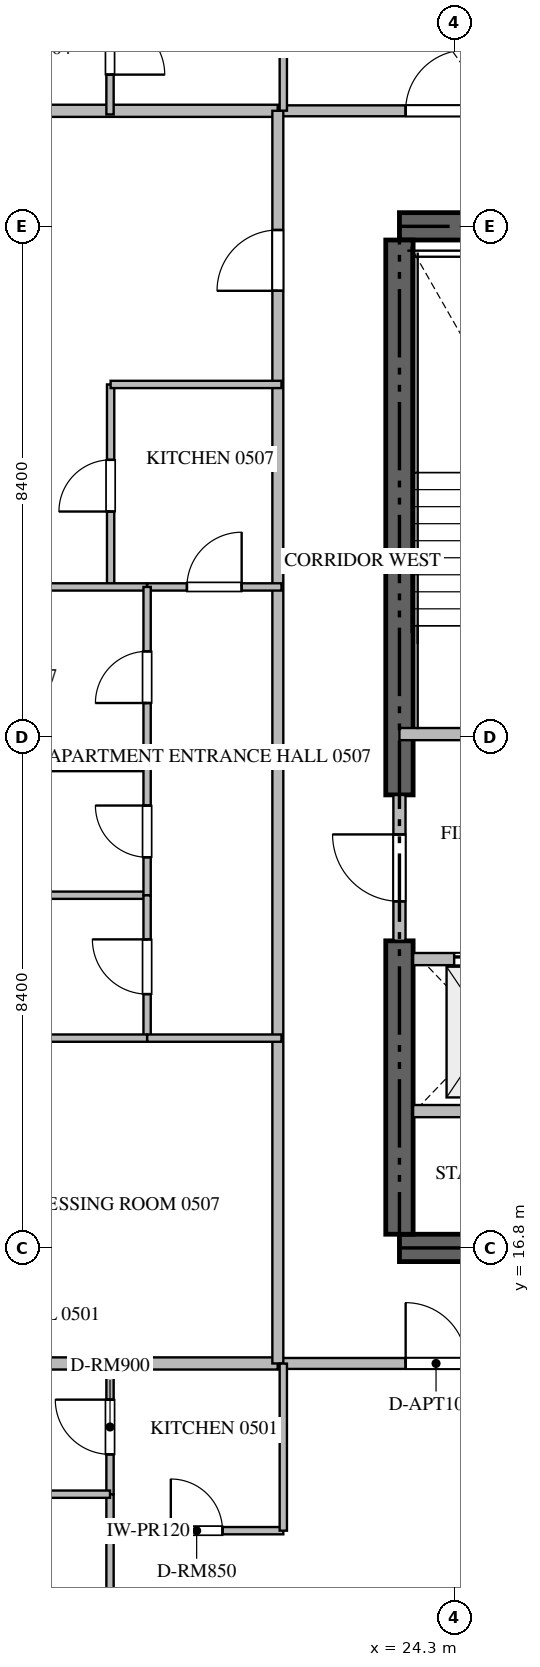
"""IFC4 building model, lengths in metres.
Left out: names, types, materials, properties, quantities, classifications, styles, units other than length and angle.
Written with IfcOpenShell. Run it as: python <this file> out.ifc"""

import sys

from ifc_helpers import new_model, si_unit, direction, frame, frame_2d, origin, place, context, subcontext, project, spatial, rectangle, extrude, source, transform, mapped, element, fill, save


model = new_model("IFC4")
c1 = context("Model", 3, precision=1e-05, world=origin(), true_north=direction((0.0, 1.0)))
c2 = subcontext(c1, "Body", "Model", "MODEL_VIEW")
j1 = project(units=[si_unit("LENGTHUNIT", "METRE"), si_unit("PLANEANGLEUNIT", "RADIAN")], contexts=[c1])
p1 = place(None, origin())
s1 = spatial("IfcSite", under=j1, at=p1, CompositionType="ELEMENT")
p2 = place(p1, origin())
s2 = spatial("IfcBuilding", under=s1, at=p2, CompositionType="ELEMENT")
p3 = place(p2, frame((0.0, 0.0, 26.7)))
s3 = spatial("IfcBuildingStorey", under=s2, at=p3, CompositionType="ELEMENT", Elevation=26.7)
for number, where, z_axis, x_axis in (
    (1, (23.4, 16.8, -0.44), (0.0, 0.0, 1.0), (1.0, 0.0, 0.0)),
    (2, (41.4, 33.6, -0.44), (0.0, 0.0, 1.0), (-1.0, 0.0, 0.0)),
):
    element("IfcWall", number, at=place(p3, frame(where, z_axis=z_axis, x_axis=x_axis)), inside=s3, PredefinedType="SHEAR", context=c2, shape_type="SweptSolid", body=[
        extrude(rectangle(XDim=18.0, YDim=0.45, at=frame_2d((9.0, 0.0))), origin(), (0.0, 0.0, 1.0), 3.928),
    ])
p4 = place(p3, frame((23.4, 17.025, -0.44), z_axis=(0.0, 0.0, 1.0), x_axis=(0.0, 1.0, 0.0)))
e3 = element("IfcWall", 3, at=p4, inside=s3, PredefinedType="SHEAR", context=c2, shape_type="SweptSolid", body=[
    extrude(rectangle(XDim=4.825, YDim=0.45, at=frame_2d((2.413, 0.0))), origin(), (0.0, 0.0, 1.0), 3.928),
])
p5 = place(p3, frame((23.4, 24.25, -0.44), z_axis=(0.0, 0.0, 1.0), x_axis=(0.0, 1.0, 0.0)))
e4 = element("IfcWall", 4, at=p5, inside=s3, PredefinedType="SHEAR", context=c2, shape_type="SweptSolid", body=[
    extrude(rectangle(XDim=9.125, YDim=0.45, at=frame_2d((4.562, 0.0))), origin(), (0.0, 0.0, 1.0), 3.928),
])
p6 = place(p3, frame((23.4, 25.25, 0.0), z_axis=(0.0, 0.0, 1.0), x_axis=(1.0, 0.0, 0.0)))
e5 = element("IfcWall", 5, at=p6, inside=s3, PredefinedType="STANDARD", context=c2, shape_type="SweptSolid", body=[
    extrude(rectangle(XDim=4.45, YDim=0.2, at=frame_2d((2.225, 0.0))), origin(), (0.0, 0.0, 1.0), 3.49),
])
p7 = place(p6, frame((1.65, 0.0, 0.0)))
e6 = element("IfcOpeningElement", 6, at=p7, cuts=e5, PredefinedType="OPENING", context=c2, shape_type="SweptSolid", body=[
    extrude(rectangle(XDim=1.1, YDim=2.15, at=frame_2d((0.55, 1.075))), frame((0.0, 0.11, 0.0), z_axis=(0.0, -1.0, 0.0), x_axis=(1.0, 0.0, 0.0)), (0.0, 0.0, 1.0), 0.22),
])
p8 = place(p3, frame((23.625, 21.55, 0.0), z_axis=(0.0, 0.0, 1.0), x_axis=(1.0, 0.0, 0.0)))
e7 = element("IfcWall", 7, at=p8, inside=s3, PredefinedType="STANDARD", context=c2, shape_type="SweptSolid", body=[
    extrude(rectangle(XDim=2.425, YDim=0.2, at=frame_2d((1.212, 0.0))), origin(), (0.0, 0.0, 1.0), 3.49),
])
p9 = place(p8, frame((0.675, 0.0, 0.0)))
e8 = element("IfcOpeningElement", 8, at=p9, cuts=e7, PredefinedType="OPENING", context=c2, shape_type="SweptSolid", body=[
    extrude(rectangle(XDim=1.2, YDim=2.2, at=frame_2d((0.6, 1.1))), frame((0.0, 0.11, 0.0), z_axis=(0.0, -1.0, 0.0), x_axis=(1.0, 0.0, 0.0)), (0.0, 0.0, 1.0), 0.22),
])
p10 = place(p3, frame((23.625, 19.05, 0.0), z_axis=(0.0, 0.0, 1.0), x_axis=(1.0, 0.0, 0.0)))
e9 = element("IfcWall", 9, at=p10, inside=s3, PredefinedType="STANDARD", context=c2, shape_type="SweptSolid", body=[
    extrude(rectangle(XDim=2.425, YDim=0.2, at=frame_2d((1.212, 0.0))), origin(), (0.0, 0.0, 1.0), 3.49),
])
p11 = place(p3, frame((23.4, 21.852, 0.0), z_axis=(0.0, 0.0, 1.0), x_axis=(0.0, 1.0, 0.0)))
e10 = element("IfcWall", 10, at=p11, inside=s3, PredefinedType="STANDARD", context=c2, shape_type="SweptSolid", body=[
    extrude(rectangle(XDim=2.396, YDim=0.2, at=frame_2d((1.198, 0.0))), origin(), (0.0, 0.0, 1.0), 3.49),
])
p12 = place(p11, frame((0.648, 0.0, 0.0)))
e11 = element("IfcOpeningElement", 11, at=p12, cuts=e10, PredefinedType="OPENING", context=c2, shape_type="SweptSolid", body=[
    extrude(rectangle(XDim=1.1, YDim=2.15, at=frame_2d((0.55, 1.075))), frame((0.0, 0.11, 0.0), z_axis=(0.0, -1.0, 0.0), x_axis=(1.0, 0.0, 0.0)), (0.0, 0.0, 1.0), 0.22),
])
for number, where, z_axis, x_axis in (
    (12, (6.082, 14.9, 0.0), (0.0, 0.0, 1.0), (1.0, 0.0, 0.0)),
    (13, (6.082, 35.5, 0.0), (0.0, 0.0, 1.0), (1.0, 0.0, 0.0)),
):
    element("IfcWall", number, at=place(p3, frame(where, z_axis=z_axis, x_axis=x_axis)), inside=s3, PredefinedType="PARTITIONING", context=c2, shape_type="SweptSolid", body=[
        extrude(rectangle(XDim=15.318, YDim=0.2, at=frame_2d((7.659, 0.0))), origin(), (0.0, 0.0, 1.0), 3.49),
    ])
p13 = place(p3, frame((21.402, 14.9, 0.0), z_axis=(0.0, 0.0, 1.0), x_axis=(1.0, 0.0, 0.0)))
e14 = element("IfcWall", 14, at=p13, inside=s3, PredefinedType="PARTITIONING", context=c2, shape_type="SweptSolid", body=[
    extrude(rectangle(XDim=21.996, YDim=0.18, at=frame_2d((10.998, 0.0))), origin(), (0.0, 0.0, 1.0), 3.49),
])
p14 = place(p13, frame((2.1, 0.0, 0.0)))
e15 = element("IfcOpeningElement", 15, at=p14, cuts=e14, PredefinedType="OPENING", context=c2, shape_type="SweptSolid", body=[
    extrude(rectangle(XDim=1.0, YDim=2.15, at=frame_2d((0.5, 1.075))), frame((0.0, 0.1, 0.0), z_axis=(0.0, -1.0, 0.0), x_axis=(1.0, 0.0, 0.0)), (0.0, 0.0, 1.0), 0.2),
])
p15 = place(p13, frame((6.719, 0.0, 0.0)))
e16 = element("IfcOpeningElement", 16, at=p15, cuts=e14, PredefinedType="OPENING", context=c2, shape_type="SweptSolid", body=[
    extrude(rectangle(XDim=1.0, YDim=2.15, at=frame_2d((0.5, 1.075))), frame((0.0, 0.1, 0.0), z_axis=(0.0, -1.0, 0.0), x_axis=(1.0, 0.0, 0.0)), (0.0, 0.0, 1.0), 0.2),
])
p16 = place(p13, frame((18.896, 0.0, 0.0)))
e17 = element("IfcOpeningElement", 17, at=p16, cuts=e14, PredefinedType="OPENING", context=c2, shape_type="SweptSolid", body=[
    extrude(rectangle(XDim=1.0, YDim=2.15, at=frame_2d((0.5, 1.075))), frame((0.0, 0.1, 0.0), z_axis=(0.0, -1.0, 0.0), x_axis=(1.0, 0.0, 0.0)), (0.0, 0.0, 1.0), 0.2),
])
p17 = place(p3, frame((21.402, 35.5, 0.0), z_axis=(0.0, 0.0, 1.0), x_axis=(1.0, 0.0, 0.0)))
e18 = element("IfcWall", 18, at=p17, inside=s3, PredefinedType="PARTITIONING", context=c2, shape_type="SweptSolid", body=[
    extrude(rectangle(XDim=21.996, YDim=0.18, at=frame_2d((10.998, 0.0))), origin(), (0.0, 0.0, 1.0), 3.49),
])
p18 = place(p17, frame((2.1, 0.0, 0.0)))
e19 = element("IfcOpeningElement", 19, at=p18, cuts=e18, PredefinedType="OPENING", context=c2, shape_type="SweptSolid", body=[
    extrude(rectangle(XDim=1.0, YDim=2.15, at=frame_2d((0.5, 1.075))), frame((0.0, 0.1, 0.0), z_axis=(0.0, -1.0, 0.0), x_axis=(1.0, 0.0, 0.0)), (0.0, 0.0, 1.0), 0.2),
])
p19 = place(p17, frame((14.277, 0.0, 0.0)))
e20 = element("IfcOpeningElement", 20, at=p19, cuts=e18, PredefinedType="OPENING", context=c2, shape_type="SweptSolid", body=[
    extrude(rectangle(XDim=1.0, YDim=2.15, at=frame_2d((0.5, 1.075))), frame((0.0, 0.1, 0.0), z_axis=(0.0, -1.0, 0.0), x_axis=(1.0, 0.0, 0.0)), (0.0, 0.0, 1.0), 0.2),
])
p20 = place(p17, frame((18.896, 0.0, 0.0)))
e21 = element("IfcOpeningElement", 21, at=p20, cuts=e18, PredefinedType="OPENING", context=c2, shape_type="SweptSolid", body=[
    extrude(rectangle(XDim=1.0, YDim=2.15, at=frame_2d((0.5, 1.075))), frame((0.0, 0.1, 0.0), z_axis=(0.0, -1.0, 0.0), x_axis=(1.0, 0.0, 0.0)), (0.0, 0.0, 1.0), 0.2),
])
p21 = place(p3, frame((21.4, 14.9, 0.0), z_axis=(0.0, 0.0, 1.0), x_axis=(0.0, 1.0, 0.0)))
e22 = element("IfcWall", 22, at=p21, inside=s3, PredefinedType="PARTITIONING", context=c2, shape_type="SweptSolid", body=[
    extrude(rectangle(XDim=20.6, YDim=0.18, at=frame_2d((10.3, 0.0))), origin(), (0.0, 0.0, 1.0), 3.49),
])
p22 = place(p21, frame((17.64, 0.0, 0.0)))
e23 = element("IfcOpeningElement", 23, at=p22, cuts=e22, PredefinedType="OPENING", context=c2, shape_type="SweptSolid", body=[
    extrude(rectangle(XDim=1.0, YDim=2.15, at=frame_2d((0.5, 1.075))), frame((0.0, 0.1, 0.0), z_axis=(0.0, -1.0, 0.0), x_axis=(1.0, 0.0, 0.0)), (0.0, 0.0, 1.0), 0.2),
])
p23 = place(p3, frame((18.64, 12.15, 0.0), z_axis=(0.0, 0.0, 1.0), x_axis=(1.0, 0.0, 0.0)))
e24 = element("IfcWall", 24, at=p23, inside=s3, PredefinedType="PARTITIONING", context=c2, shape_type="SweptSolid", body=[
    extrude(rectangle(XDim=2.85, YDim=0.12, at=frame_2d((1.425, 0.0))), origin(), (0.0, 0.0, 1.0), 3.49),
])
p24 = place(p23, frame((1.0, 0.0, 0.0)))
e25 = element("IfcOpeningElement", 25, at=p24, cuts=e24, PredefinedType="OPENING", context=c2, shape_type="SweptSolid", body=[
    extrude(rectangle(XDim=0.85, YDim=2.1, at=frame_2d((0.425, 1.05))), frame((0.0, 0.07, 0.0), z_axis=(0.0, -1.0, 0.0), x_axis=(1.0, 0.0, 0.0)), (0.0, 0.0, 1.0), 0.14),
])
p25 = place(p3, frame((21.49, 12.15, 0.0), z_axis=(0.0, 0.0, 1.0), x_axis=(0.0, 1.0, 0.0)))
e26 = element("IfcWall", 26, at=p25, inside=s3, PredefinedType="PARTITIONING", context=c2, shape_type="SweptSolid", body=[
    extrude(rectangle(XDim=2.748, YDim=0.12, at=frame_2d((1.374, 0.0))), origin(), (0.0, 0.0, 1.0), 3.49),
])
p26 = place(p3, frame((18.64, 12.75, 0.0), z_axis=(0.0, 0.0, 1.0), x_axis=(0.0, 1.0, 0.0)))
e27 = element("IfcWall", 27, at=p26, inside=s3, PredefinedType="PARTITIONING", context=c2, shape_type="SweptSolid", body=[
    extrude(rectangle(XDim=2.21, YDim=0.12, at=frame_2d((1.105, 0.0))), origin(), (0.0, 0.0, 1.0), 3.49),
])
p27 = place(p26, frame((0.655, 0.0, 0.0)))
e28 = element("IfcOpeningElement", 28, at=p27, cuts=e27, PredefinedType="OPENING", context=c2, shape_type="SweptSolid", body=[
    extrude(rectangle(XDim=0.9, YDim=2.1, at=frame_2d((0.45, 1.05))), frame((0.0, 0.07, 0.0), z_axis=(0.0, -1.0, 0.0), x_axis=(1.0, 0.0, 0.0)), (0.0, 0.0, 1.0), 0.14),
])
p28 = place(p3, frame((18.64, 7.73, 0.0), z_axis=(0.0, 0.0, 1.0), x_axis=(0.0, 1.0, 0.0)))
e29 = element("IfcWall", 29, at=p28, inside=s3, PredefinedType="PARTITIONING", context=c2, shape_type="SweptSolid", body=[
    extrude(rectangle(XDim=5.018, YDim=0.12, at=frame_2d((2.509, 0.0))), origin(), (0.0, 0.0, 1.0), 3.49),
])
p29 = place(p3, frame((15.592, 12.75, 0.0), z_axis=(0.0, 0.0, 1.0), x_axis=(1.0, 0.0, 0.0)))
e30 = element("IfcWall", 30, at=p29, inside=s3, PredefinedType="PARTITIONING", context=c2, shape_type="SweptSolid", body=[
    extrude(rectangle(XDim=3.048, YDim=0.12, at=frame_2d((1.524, 0.0))), origin(), (0.0, 0.0, 1.0), 3.49),
])
p30 = place(p29, frame((1.099, 0.0, 0.0)))
e31 = element("IfcOpeningElement", 31, at=p30, cuts=e30, PredefinedType="OPENING", context=c2, shape_type="SweptSolid", body=[
    extrude(rectangle(XDim=0.85, YDim=2.1, at=frame_2d((0.425, 1.05))), frame((0.0, 0.07, 0.0), z_axis=(0.0, -1.0, 0.0), x_axis=(1.0, 0.0, 0.0)), (0.0, 0.0, 1.0), 0.14),
])
p31 = place(p3, frame((21.49, 38.25, 0.0), z_axis=(0.0, 0.0, 1.0), x_axis=(0.0, -1.0, 0.0)))
e32 = element("IfcWall", 32, at=p31, inside=s3, PredefinedType="PARTITIONING", context=c2, shape_type="SweptSolid", body=[
    extrude(rectangle(XDim=2.748, YDim=0.12, at=frame_2d((1.374, 0.0))), origin(), (0.0, 0.0, 1.0), 3.49),
])
p32 = place(p3, frame((18.64, 37.65, 0.0), z_axis=(0.0, 0.0, 1.0), x_axis=(0.0, -1.0, 0.0)))
e33 = element("IfcWall", 33, at=p32, inside=s3, PredefinedType="PARTITIONING", context=c2, shape_type="SweptSolid", body=[
    extrude(rectangle(XDim=2.21, YDim=0.12, at=frame_2d((1.105, 0.0))), origin(), (0.0, 0.0, 1.0), 3.49),
])
p33 = place(p32, frame((0.655, 0.0, 0.0)))
e34 = element("IfcOpeningElement", 34, at=p33, cuts=e33, PredefinedType="OPENING", context=c2, shape_type="SweptSolid", body=[
    extrude(rectangle(XDim=0.9, YDim=2.1, at=frame_2d((0.45, 1.05))), frame((0.0, 0.07, 0.0), z_axis=(0.0, -1.0, 0.0), x_axis=(1.0, 0.0, 0.0)), (0.0, 0.0, 1.0), 0.14),
])
p34 = place(p3, frame((18.65, 27.67, 0.0), z_axis=(0.0, 0.0, 1.0), x_axis=(0.0, 1.0, 0.0)))
e35 = element("IfcWall", 35, at=p34, inside=s3, PredefinedType="PARTITIONING", context=c2, shape_type="SweptSolid", body=[
    extrude(rectangle(XDim=3.33, YDim=0.12, at=frame_2d((1.665, 0.0))), origin(), (0.0, 0.0, 1.0), 3.49),
])
p35 = place(p34, frame((1.24, 0.0, 0.0)))
e36 = element("IfcOpeningElement", 36, at=p35, cuts=e35, PredefinedType="OPENING", context=c2, shape_type="SweptSolid", body=[
    extrude(rectangle(XDim=0.85, YDim=2.1, at=frame_2d((0.425, 1.05))), frame((0.0, 0.07, 0.0), z_axis=(0.0, -1.0, 0.0), x_axis=(1.0, 0.0, 0.0)), (0.0, 0.0, 1.0), 0.14),
])
p36 = place(p3, frame((18.65, 31.0, 0.0), z_axis=(0.0, 0.0, 1.0), x_axis=(1.0, 0.0, 0.0)))
e37 = element("IfcWall", 37, at=p36, inside=s3, PredefinedType="PARTITIONING", context=c2, shape_type="SweptSolid", body=[
    extrude(rectangle(XDim=2.81, YDim=0.12, at=frame_2d((1.405, 0.0))), origin(), (0.0, 0.0, 1.0), 3.49),
])
p37 = place(p3, frame((19.25, 27.67, 0.0), z_axis=(0.0, 0.0, 1.0), x_axis=(1.0, 0.0, 0.0)))
e38 = element("IfcWall", 38, at=p37, inside=s3, PredefinedType="PARTITIONING", context=c2, shape_type="SweptSolid", body=[
    extrude(rectangle(XDim=2.21, YDim=0.12, at=frame_2d((1.105, 0.0))), origin(), (0.0, 0.0, 1.0), 3.49),
])
p38 = place(p37, frame((0.655, 0.0, 0.0)))
e39 = element("IfcOpeningElement", 39, at=p38, cuts=e38, PredefinedType="OPENING", context=c2, shape_type="SweptSolid", body=[
    extrude(rectangle(XDim=0.9, YDim=2.1, at=frame_2d((0.45, 1.05))), frame((0.0, 0.07, 0.0), z_axis=(0.0, -1.0, 0.0), x_axis=(1.0, 0.0, 0.0)), (0.0, 0.0, 1.0), 0.14),
])
p39 = place(p3, frame((12.767, 27.67, 0.0), z_axis=(0.0, 0.0, 1.0), x_axis=(1.0, 0.0, 0.0)))
e40 = element("IfcWall", 40, at=p39, inside=s3, PredefinedType="PARTITIONING", context=c2, shape_type="SweptSolid", body=[
    extrude(rectangle(XDim=6.481, YDim=0.12, at=frame_2d((3.24, 0.0))), origin(), (0.0, 0.0, 1.0), 3.49),
])
p40 = place(p3, frame((6.095, 22.6, 0.0), z_axis=(0.0, 0.0, 1.0), x_axis=(1.0, 0.0, 0.0)))
e41 = element("IfcWall", 41, at=p40, inside=s3, PredefinedType="PARTITIONING", context=c2, shape_type="SweptSolid", body=[
    extrude(rectangle(XDim=13.155, YDim=0.12, at=frame_2d((6.578, 0.0))), origin(), (0.0, 0.0, 1.0), 3.49),
])
p41 = place(p3, frame((12.765, 24.7, 0.0), z_axis=(0.0, 0.0, 1.0), x_axis=(1.0, 0.0, 0.0)))
e42 = element("IfcWall", 42, at=p41, inside=s3, PredefinedType="PARTITIONING", context=c2, shape_type="SweptSolid", body=[
    extrude(rectangle(XDim=6.485, YDim=0.12, at=frame_2d((3.243, 0.0))), origin(), (0.0, 0.0, 1.0), 3.49),
])
p42 = place(p3, frame((19.25, 22.6, 0.0), z_axis=(0.0, 0.0, 1.0), x_axis=(0.0, 1.0, 0.0)))
e43 = element("IfcWall", 43, at=p42, inside=s3, PredefinedType="PARTITIONING", context=c2, shape_type="SweptSolid", body=[
    extrude(rectangle(XDim=2.1, YDim=0.12, at=frame_2d((1.05, 0.0))), origin(), (0.0, 0.0, 1.0), 3.49),
])
p43 = place(p42, frame((0.625, 0.0, 0.0)))
e44 = element("IfcOpeningElement", 44, at=p43, cuts=e43, PredefinedType="OPENING", context=c2, shape_type="SweptSolid", body=[
    extrude(rectangle(XDim=0.85, YDim=2.1, at=frame_2d((0.425, 1.05))), frame((0.0, 0.07, 0.0), z_axis=(0.0, -1.0, 0.0), x_axis=(1.0, 0.0, 0.0)), (0.0, 0.0, 1.0), 0.14),
])
p44 = place(p3, frame((19.25, 24.702, 0.0), z_axis=(0.0, 0.0, 1.0), x_axis=(0.0, 1.0, 0.0)))
e45 = element("IfcWall", 45, at=p44, inside=s3, PredefinedType="PARTITIONING", context=c2, shape_type="SweptSolid", body=[
    extrude(rectangle(XDim=2.968, YDim=0.12, at=frame_2d((1.484, 0.0))), origin(), (0.0, 0.0, 1.0), 3.49),
])
p45 = place(p44, frame((1.059, 0.0, 0.0)))
e46 = element("IfcOpeningElement", 46, at=p45, cuts=e45, PredefinedType="OPENING", context=c2, shape_type="SweptSolid", body=[
    extrude(rectangle(XDim=0.85, YDim=2.1, at=frame_2d((0.425, 1.05))), frame((0.0, 0.07, 0.0), z_axis=(0.0, -1.0, 0.0), x_axis=(1.0, 0.0, 0.0)), (0.0, 0.0, 1.0), 0.14),
])
p46 = place(p3, frame((19.25, 20.25, 0.0), z_axis=(0.0, 0.0, 1.0), x_axis=(0.0, 1.0, 0.0)))
e47 = element("IfcWall", 47, at=p46, inside=s3, PredefinedType="PARTITIONING", context=c2, shape_type="SweptSolid", body=[
    extrude(rectangle(XDim=2.348, YDim=0.12, at=frame_2d((1.174, 0.0))), origin(), (0.0, 0.0, 1.0), 3.49),
])
p47 = place(p46, frame((0.724, 0.0, 0.0)))
e48 = element("IfcOpeningElement", 48, at=p47, cuts=e47, PredefinedType="OPENING", context=c2, shape_type="SweptSolid", body=[
    extrude(rectangle(XDim=0.9, YDim=2.1, at=frame_2d((0.45, 1.05))), frame((0.0, 0.07, 0.0), z_axis=(0.0, -1.0, 0.0), x_axis=(1.0, 0.0, 0.0)), (0.0, 0.0, 1.0), 0.14),
])
p48 = place(p3, frame((12.669, 20.25, 0.0), z_axis=(0.0, 0.0, 1.0), x_axis=(1.0, 0.0, 0.0)))
e49 = element("IfcWall", 49, at=p48, inside=s3, PredefinedType="PARTITIONING", context=c2, shape_type="SweptSolid", body=[
    extrude(rectangle(XDim=6.581, YDim=0.12, at=frame_2d((3.291, 0.0))), origin(), (0.0, 0.0, 1.0), 3.49),
])
p49 = place(p48, frame((2.865, 0.0, 0.0)))
e50 = element("IfcOpeningElement", 50, at=p49, cuts=e49, PredefinedType="OPENING", context=c2, shape_type="SweptSolid", body=[
    extrude(rectangle(XDim=0.85, YDim=2.1, at=frame_2d((0.425, 1.05))), frame((0.0, 0.07, 0.0), z_axis=(0.0, -1.0, 0.0), x_axis=(1.0, 0.0, 0.0)), (0.0, 0.0, 1.0), 0.14),
])
p50 = place(p3, frame((19.252, 20.25, 0.0), z_axis=(0.0, 0.0, 1.0), x_axis=(1.0, 0.0, 0.0)))
e51 = element("IfcWall", 51, at=p50, inside=s3, PredefinedType="PARTITIONING", context=c2, shape_type="SweptSolid", body=[
    extrude(rectangle(XDim=2.208, YDim=0.12, at=frame_2d((1.104, 0.0))), origin(), (0.0, 0.0, 1.0), 3.49),
])
m1 = source(origin(), c2, "Body", "SweptSolid", [
    extrude(rectangle(XDim=1.2, YDim=2.2, at=frame_2d((0.6, 1.1))), frame((0.0, 0.025, 0.0), z_axis=(0.0, -1.0, 0.0), x_axis=(1.0, 0.0, 0.0)), (0.0, 0.0, 1.0), 0.05),
])
p51 = place(p9, origin())
e52 = element("IfcDoor", 52, at=p51, inside=s3, OperationType="DOUBLE_DOOR_SLIDING", PredefinedType="DOOR", context=c2, shape_type="MappedRepresentation", body=[
    mapped(m1, transform((0.0, 0.0, 0.0), scale=1.0)),
])
fill(e8, e52)
m2 = source(origin(), c2, "Body", "SweptSolid", [
    extrude(rectangle(XDim=1.1, YDim=2.15, at=frame_2d((0.55, 1.075))), frame((0.0, 0.025, 0.0), z_axis=(0.0, -1.0, 0.0), x_axis=(1.0, 0.0, 0.0)), (0.0, 0.0, 1.0), 0.05),
])
p52 = place(p12, origin())
e53 = element("IfcDoor", 53, at=p52, inside=s3, OperationType="SINGLE_SWING_RIGHT", PredefinedType="DOOR", context=c2, shape_type="MappedRepresentation", body=[
    mapped(m2, transform((0.0, 0.0, 0.0), scale=1.0)),
])
fill(e11, e53)
m3 = source(origin(), c2, "Body", "SweptSolid", [
    extrude(rectangle(XDim=1.0, YDim=2.15, at=frame_2d((0.5, 1.075))), frame((0.0, 0.025, 0.0), z_axis=(0.0, -1.0, 0.0), x_axis=(1.0, 0.0, 0.0)), (0.0, 0.0, 1.0), 0.05),
])
p53 = place(p14, origin())
e54 = element("IfcDoor", 54, at=p53, inside=s3, OperationType="SINGLE_SWING_LEFT", PredefinedType="DOOR", context=c2, shape_type="MappedRepresentation", body=[
    mapped(m3, transform((0.0, 0.0, 0.0), scale=1.0)),
])
fill(e15, e54)
p54 = place(p18, origin())
e55 = element("IfcDoor", 55, at=p54, inside=s3, OperationType="SINGLE_SWING_RIGHT", PredefinedType="DOOR", context=c2, shape_type="MappedRepresentation", body=[
    mapped(m3, transform((0.0, 0.0, 0.0), scale=1.0)),
])
fill(e19, e55)
p55 = place(p22, origin())
e56 = element("IfcDoor", 56, at=p55, inside=s3, OperationType="SINGLE_SWING_LEFT", PredefinedType="DOOR", context=c2, shape_type="MappedRepresentation", body=[
    mapped(m3, transform((0.0, 0.0, 0.0), scale=1.0)),
])
fill(e23, e56)
m4 = source(origin(), c2, "Body", "SweptSolid", [
    extrude(rectangle(XDim=0.85, YDim=2.1, at=frame_2d((0.425, 1.05))), frame((0.0, 0.025, 0.0), z_axis=(0.0, -1.0, 0.0), x_axis=(1.0, 0.0, 0.0)), (0.0, 0.0, 1.0), 0.05),
])
p56 = place(p24, origin())
e57 = element("IfcDoor", 57, at=p56, inside=s3, OperationType="SINGLE_SWING_LEFT", PredefinedType="DOOR", context=c2, shape_type="MappedRepresentation", body=[
    mapped(m4, transform((0.0, 0.0, 0.0), scale=1.0)),
])
fill(e25, e57)
m5 = source(origin(), c2, "Body", "SweptSolid", [
    extrude(rectangle(XDim=0.9, YDim=2.1, at=frame_2d((0.45, 1.05))), frame((0.0, 0.025, 0.0), z_axis=(0.0, -1.0, 0.0), x_axis=(1.0, 0.0, 0.0)), (0.0, 0.0, 1.0), 0.05),
])
p57 = place(p27, origin())
e58 = element("IfcDoor", 58, at=p57, inside=s3, OperationType="SINGLE_SWING_RIGHT", PredefinedType="DOOR", context=c2, shape_type="MappedRepresentation", body=[
    mapped(m5, transform((0.0, 0.0, 0.0), scale=1.0)),
])
fill(e28, e58)
p58 = place(p33, origin())
e59 = element("IfcDoor", 59, at=p58, inside=s3, OperationType="SINGLE_SWING_RIGHT", PredefinedType="DOOR", context=c2, shape_type="MappedRepresentation", body=[
    mapped(m5, transform((0.0, 0.0, 0.0), scale=1.0)),
])
fill(e34, e59)
p59 = place(p35, origin())
e60 = element("IfcDoor", 60, at=p59, inside=s3, OperationType="SINGLE_SWING_LEFT", PredefinedType="DOOR", context=c2, shape_type="MappedRepresentation", body=[
    mapped(m4, transform((0.0, 0.0, 0.0), scale=1.0)),
])
fill(e36, e60)
p60 = place(p38, origin())
e61 = element("IfcDoor", 61, at=p60, inside=s3, OperationType="SINGLE_SWING_RIGHT", PredefinedType="DOOR", context=c2, shape_type="MappedRepresentation", body=[
    mapped(m5, transform((0.0, 0.0, 0.0), scale=1.0)),
])
fill(e39, e61)
p61 = place(p43, origin())
e62 = element("IfcDoor", 62, at=p61, inside=s3, OperationType="SINGLE_SWING_RIGHT", PredefinedType="DOOR", context=c2, shape_type="MappedRepresentation", body=[
    mapped(m4, transform((0.0, 0.0, 0.0), scale=1.0)),
])
fill(e44, e62)
p62 = place(p45, origin())
e63 = element("IfcDoor", 63, at=p62, inside=s3, OperationType="SINGLE_SWING_LEFT", PredefinedType="DOOR", context=c2, shape_type="MappedRepresentation", body=[
    mapped(m4, transform((0.0, 0.0, 0.0), scale=1.0)),
])
fill(e46, e63)
p63 = place(p47, origin())
e64 = element("IfcDoor", 64, at=p63, inside=s3, OperationType="SINGLE_SWING_RIGHT", PredefinedType="DOOR", context=c2, shape_type="MappedRepresentation", body=[
    mapped(m5, transform((0.0, 0.0, 0.0), scale=1.0)),
])
fill(e48, e64)
save(model, sys.argv[1])
